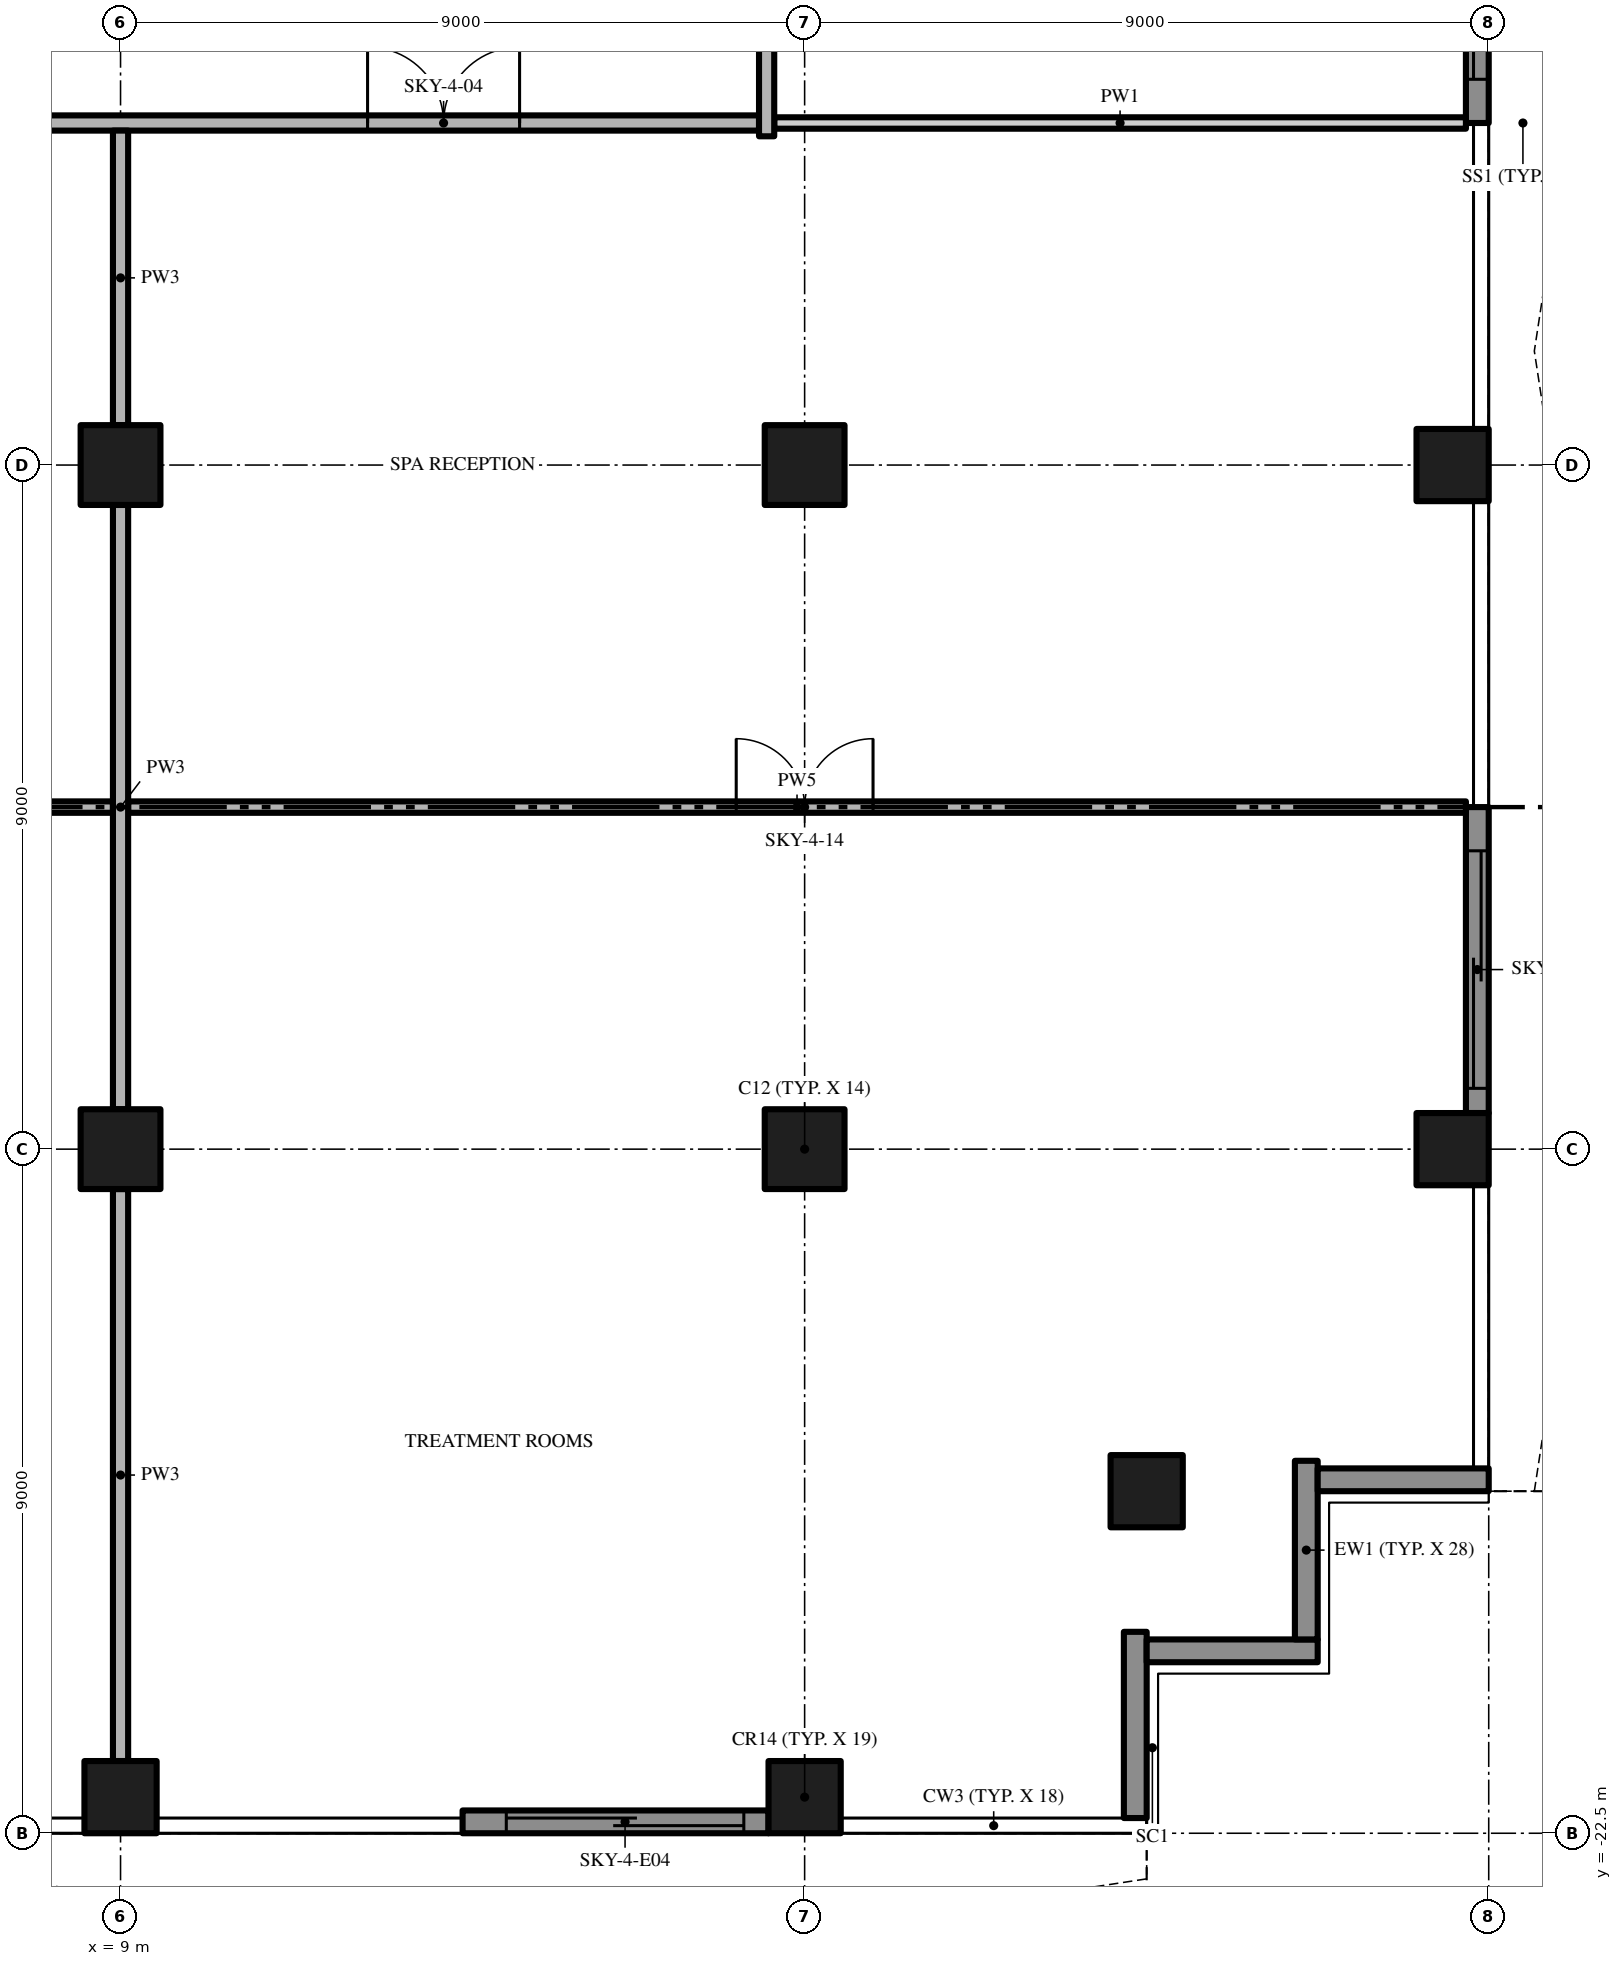
"""IFC4 building model, lengths in metres.
Left out: names, types, materials, properties, quantities, classifications, styles, units other than length and angle.
Written with IfcOpenShell. Run it as: python <this file> out.ifc"""

import sys

from ifc_helpers import new_model, si_unit, direction, frame, frame_2d, origin, origin_2d, place, context, subcontext, project, spatial, polyline, rectangle, outline, extrude, element, fill, save


model = new_model("IFC4")
c1 = context("Model", 3, precision=1e-05, world=origin(), true_north=direction((0.0, 1.0)))
c2 = subcontext(c1, "Body", "Model", "MODEL_VIEW")
j1 = project(units=[si_unit("LENGTHUNIT", "METRE"), si_unit("PLANEANGLEUNIT", "RADIAN")], contexts=[c1])
p1 = place(None, origin())
s1 = spatial("IfcSite", under=j1, at=p1, CompositionType="ELEMENT")
p2 = place(p1, origin())
s2 = spatial("IfcBuilding", under=s1, at=p2, CompositionType="ELEMENT")
p3 = place(p2, frame((0.0, 0.0, 233.8)))
s3 = spatial("IfcBuildingStorey", under=s2, at=p3, CompositionType="ELEMENT", Elevation=233.8)
p4 = place(p3, frame((18.0, -13.5, 0.0), z_axis=(0.0, 0.0, 1.0), x_axis=(1.0, 0.0, 0.0)))
e1 = element("IfcColumn", 1, at=p4, inside=s3, PredefinedType="COLUMN", context=c2, shape_type="SweptSolid", body=[
    extrude(rectangle(XDim=1.05, YDim=1.05, at=origin_2d()), origin(), (0.0, 0.0, 1.0), 4.7),
])
p5 = place(p3, frame((18.0, -22.025, 0.0), z_axis=(0.0, 0.0, 1.0), x_axis=(1.0, 0.0, 0.0)))
e2 = element("IfcColumn", 2, at=p5, inside=s3, PredefinedType="COLUMN", context=c2, shape_type="SweptSolid", body=[
    extrude(rectangle(XDim=0.95, YDim=0.95, at=origin_2d()), origin(), (0.0, 0.0, 1.0), 4.7),
])
p6 = place(p3, frame((18.0, -4.5, 0.0), z_axis=(0.0, 0.0, 1.0), x_axis=(1.0, 0.0, 0.0)))
e3 = element("IfcColumn", 3, at=p6, inside=s3, PredefinedType="COLUMN", context=c2, shape_type="SweptSolid", body=[
    extrude(rectangle(XDim=1.05, YDim=1.05, at=origin_2d()), origin(), (0.0, 0.0, 1.0), 4.7),
])
for number, where, z_axis, x_axis in (
    (4, (26.525, -13.5, 0.0), (0.0, 0.0, 1.0), (1.0, 0.0, 0.0)),
    (5, (22.5, -18.0, 0.0), (0.0, 0.0, 1.0), (1.0, 0.0, 0.0)),
    (6, (26.525, -4.5, 0.0), (0.0, 0.0, 1.0), (1.0, 0.0, 0.0)),
):
    element("IfcColumn", number, at=place(p3, frame(where, z_axis=z_axis, x_axis=x_axis)), inside=s3, PredefinedType="COLUMN", context=c2, shape_type="SweptSolid", body=[
        extrude(rectangle(XDim=0.95, YDim=0.95, at=origin_2d()), origin(), (0.0, 0.0, 1.0), 4.7),
    ])
p7 = place(p3, frame((9.0, -13.5, 0.0), z_axis=(0.0, 0.0, 1.0), x_axis=(1.0, 0.0, 0.0)))
e7 = element("IfcColumn", 7, at=p7, inside=s3, PredefinedType="COLUMN", context=c2, shape_type="SweptSolid", body=[
    extrude(rectangle(XDim=1.05, YDim=1.05, at=origin_2d()), origin(), (0.0, 0.0, 1.0), 4.7),
])
p8 = place(p3, frame((9.0, -22.025, 0.0), z_axis=(0.0, 0.0, 1.0), x_axis=(1.0, 0.0, 0.0)))
e8 = element("IfcColumn", 8, at=p8, inside=s3, PredefinedType="COLUMN", context=c2, shape_type="SweptSolid", body=[
    extrude(rectangle(XDim=0.95, YDim=0.95, at=origin_2d()), origin(), (0.0, 0.0, 1.0), 4.7),
])
p9 = place(p3, frame((9.0, -4.5, 0.0), z_axis=(0.0, 0.0, 1.0), x_axis=(1.0, 0.0, 0.0)))
e9 = element("IfcColumn", 9, at=p9, inside=s3, PredefinedType="COLUMN", context=c2, shape_type="SweptSolid", body=[
    extrude(rectangle(XDim=1.05, YDim=1.05, at=origin_2d()), origin(), (0.0, 0.0, 1.0), 4.7),
])
p10 = place(p3, frame((17.525, -22.35, 0.0), z_axis=(0.0, 0.0, 1.0), x_axis=(-1.0, 0.0, 0.0)))
e10 = element("IfcWall", 10, at=p10, inside=s3, PredefinedType="SOLIDWALL", context=c2, shape_type="SweptSolid", body=[
    extrude(rectangle(XDim=4.025, YDim=0.3, at=frame_2d((2.013, 0.0))), origin(), (0.0, 0.0, 1.0), 4.7),
])
p11 = place(p10, frame((0.325, 0.0, 0.0)))
e11 = element("IfcOpeningElement", 11, at=p11, cuts=e10, PredefinedType="OPENING", context=c2, shape_type="SweptSolid", body=[
    extrude(rectangle(XDim=3.125, YDim=2.4, at=frame_2d((1.562, 1.2))), frame((0.0, 0.16, 0.0), z_axis=(0.0, -1.0, 0.0), x_axis=(1.0, 0.0, 0.0)), (0.0, 0.0, 1.0), 0.32),
])
p12 = place(p3, frame((22.35, -19.85, 0.0), z_axis=(0.0, 0.0, 1.0), x_axis=(0.0, -1.0, 0.0)))
e12 = element("IfcWall", 12, at=p12, inside=s3, PredefinedType="SOLIDWALL", context=c2, shape_type="SweptSolid", body=[
    extrude(rectangle(XDim=2.45, YDim=0.3, at=frame_2d((1.225, 0.0))), origin(), (0.0, 0.0, 1.0), 4.7),
])
p13 = place(p3, frame((24.75, -20.1, 0.0), z_axis=(0.0, 0.0, 1.0), x_axis=(-1.0, 0.0, 0.0)))
e13 = element("IfcWall", 13, at=p13, inside=s3, PredefinedType="SOLIDWALL", context=c2, shape_type="SweptSolid", body=[
    extrude(rectangle(XDim=2.25, YDim=0.3, at=frame_2d((1.125, 0.0))), origin(), (0.0, 0.0, 1.0), 4.7),
])
p14 = place(p3, frame((24.6, -17.6, 0.0), z_axis=(0.0, 0.0, 1.0), x_axis=(0.0, -1.0, 0.0)))
e14 = element("IfcWall", 14, at=p14, inside=s3, PredefinedType="SOLIDWALL", context=c2, shape_type="SweptSolid", body=[
    extrude(rectangle(XDim=2.35, YDim=0.3, at=frame_2d((1.175, 0.0))), origin(), (0.0, 0.0, 1.0), 4.7),
])
p15 = place(p3, frame((27.0, -17.85, 0.0), z_axis=(0.0, 0.0, 1.0), x_axis=(-1.0, 0.0, 0.0)))
e15 = element("IfcWall", 15, at=p15, inside=s3, PredefinedType="SOLIDWALL", context=c2, shape_type="SweptSolid", body=[
    extrude(rectangle(XDim=2.25, YDim=0.3, at=frame_2d((1.125, 0.0))), origin(), (0.0, 0.0, 1.0), 4.7),
])
p16 = place(p3, frame((26.85, -9.0, 0.0), z_axis=(0.0, 0.0, 1.0), x_axis=(0.0, -1.0, 0.0)))
e16 = element("IfcWall", 16, at=p16, inside=s3, PredefinedType="SOLIDWALL", context=c2, shape_type="SweptSolid", body=[
    extrude(rectangle(XDim=4.025, YDim=0.3, at=frame_2d((2.013, 0.0))), origin(), (0.0, 0.0, 1.0), 4.7),
])
p17 = place(p16, frame((0.575, 0.0, 0.0)))
e17 = element("IfcOpeningElement", 17, at=p17, cuts=e16, PredefinedType="OPENING", context=c2, shape_type="SweptSolid", body=[
    extrude(rectangle(XDim=3.125, YDim=2.4, at=frame_2d((1.562, 1.2))), frame((0.0, 0.16, 0.0), z_axis=(0.0, -1.0, 0.0), x_axis=(1.0, 0.0, 0.0)), (0.0, 0.0, 1.0), 0.32),
])
p18 = place(p3, frame((26.85, 4.025, 0.0), z_axis=(0.0, 0.0, 1.0), x_axis=(0.0, -1.0, 0.0)))
e18 = element("IfcWall", 18, at=p18, inside=s3, PredefinedType="SOLIDWALL", context=c2, shape_type="SweptSolid", body=[
    extrude(rectangle(XDim=4.025, YDim=0.3, at=frame_2d((2.013, 0.0))), origin(), (0.0, 0.0, 1.0), 4.7),
])
p19 = place(p18, frame((0.325, 0.0, 0.0)))
e19 = element("IfcOpeningElement", 19, at=p19, cuts=e18, PredefinedType="OPENING", context=c2, shape_type="SweptSolid", body=[
    extrude(rectangle(XDim=3.125, YDim=2.4, at=frame_2d((1.562, 1.2))), frame((0.0, 0.16, 0.0), z_axis=(0.0, -1.0, 0.0), x_axis=(1.0, 0.0, 0.0)), (0.0, 0.0, 1.0), 0.32),
])
p20 = place(p3, origin())
e20 = element("IfcWall", 20, at=p20, inside=s3, PredefinedType="USERDEFINED", context=c2, shape_type="SweptSolid", body=[
    extrude(outline(polyline([(-22.5, -23.1), (-21.0, -23.329), (-19.5, -23.929), (-18.0, -24.671), (-16.5, -25.271), (-15.0, -25.5), (-13.5, -25.271), (-12.0, -24.671), (-10.5, -23.929), (-9.0, -23.329), (-7.5, -23.1), (-6.0, -23.329), (-4.5, -23.929), (-3.0, -24.671), (-1.5, -25.271), (0.0, -25.5), (1.5, -25.271), (3.0, -24.671), (4.5, -23.929), (6.0, -23.329), (7.5, -23.1), (9.0, -23.329), (10.5, -23.929), (12.0, -24.671), (13.5, -25.271), (15.0, -25.5), (16.5, -25.271), (18.0, -24.671), (19.5, -23.929), (21.0, -23.329), (22.5, -23.1), (22.462, -22.853), (20.934, -23.086), (19.398, -23.701), (17.898, -24.442), (16.434, -25.028), (15.0, -25.247), (13.566, -25.028), (12.102, -24.442), (10.602, -23.701), (9.066, -23.086), (7.5, -22.847), (5.934, -23.086), (4.398, -23.701), (2.898, -24.442), (1.434, -25.028), (0.0, -25.247), (-1.434, -25.028), (-2.898, -24.442), (-4.398, -23.701), (-5.934, -23.086), (-7.5, -22.847), (-9.066, -23.086), (-10.602, -23.701), (-12.102, -24.442), (-13.566, -25.028), (-15.0, -25.247), (-16.434, -25.028), (-17.898, -24.442), (-19.398, -23.701), (-20.934, -23.086), (-22.462, -22.853), (-22.5, -23.1)])), origin(), (0.0, 0.0, 1.0), 0.9),
])
p21 = place(p3, origin())
e21 = element("IfcWall", 21, at=p21, inside=s3, PredefinedType="USERDEFINED", context=c2, shape_type="SweptSolid", body=[
    extrude(outline(polyline([(27.6, -18.0), (27.829, -16.5), (28.429, -15.0), (29.171, -13.5), (29.771, -12.0), (30.0, -10.5), (29.771, -9.0), (29.171, -7.5), (28.429, -6.0), (27.829, -4.5), (27.6, -3.0), (27.829, -1.5), (28.429, 0.0), (29.171, 1.5), (29.771, 3.0), (30.0, 4.5), (29.771, 6.0), (29.171, 7.5), (28.429, 9.0), (27.829, 10.5), (27.6, 12.0), (27.829, 13.5), (28.429, 15.0), (29.171, 16.5), (29.771, 18.0), (29.539, 18.093), (28.942, 16.602), (28.201, 15.102), (27.586, 13.566), (27.347, 12.0), (27.586, 10.434), (28.201, 8.898), (28.942, 7.398), (29.528, 5.934), (29.747, 4.5), (29.528, 3.066), (28.942, 1.602), (28.201, 0.102), (27.586, -1.434), (27.347, -3.0), (27.586, -4.566), (28.201, -6.102), (28.942, -7.602), (29.528, -9.066), (29.747, -10.5), (29.528, -11.934), (28.942, -13.398), (28.201, -14.898), (27.586, -16.434), (27.353, -17.962), (27.6, -18.0)])), origin(), (0.0, 0.0, 1.0), 0.9),
])
p22 = place(p3, frame((-8.9, -9.0, 0.0), z_axis=(0.0, 0.0, 1.0), x_axis=(1.0, 0.0, 0.0)))
e22 = element("IfcWall", 22, at=p22, inside=s3, PredefinedType="PARTITIONING", context=c2, shape_type="SweptSolid", body=[
    extrude(rectangle(XDim=17.8, YDim=0.15, at=frame_2d((8.9, 0.0))), origin(), (0.0, 0.0, 1.0), 4.7),
])
p23 = place(p22, frame((8.0, 0.0, 0.0)))
e23 = element("IfcOpeningElement", 23, at=p23, cuts=e22, PredefinedType="OPENING", context=c2, shape_type="SweptSolid", body=[
    extrude(rectangle(XDim=1.8, YDim=2.4, at=frame_2d((0.9, 1.2))), frame((0.0, 0.085, 0.0), z_axis=(0.0, -1.0, 0.0), x_axis=(1.0, 0.0, 0.0)), (0.0, 0.0, 1.0), 0.17),
])
p24 = place(p3, frame((9.1, -9.0, 0.0), z_axis=(0.0, 0.0, 1.0), x_axis=(1.0, 0.0, 0.0)))
e24 = element("IfcWall", 24, at=p24, inside=s3, PredefinedType="PARTITIONING", context=c2, shape_type="SweptSolid", body=[
    extrude(rectangle(XDim=17.6, YDim=0.15, at=frame_2d((8.8, 0.0))), origin(), (0.0, 0.0, 1.0), 4.7),
])
p25 = place(p24, frame((8.0, 0.0, 0.0)))
e25 = element("IfcOpeningElement", 25, at=p25, cuts=e24, PredefinedType="OPENING", context=c2, shape_type="SweptSolid", body=[
    extrude(rectangle(XDim=1.8, YDim=2.4, at=frame_2d((0.9, 1.2))), frame((0.0, 0.085, 0.0), z_axis=(0.0, -1.0, 0.0), x_axis=(1.0, 0.0, 0.0)), (0.0, 0.0, 1.0), 0.17),
])
p26 = place(p3, frame((-17.4, 0.0, 0.0), z_axis=(0.0, 0.0, 1.0), x_axis=(1.0, 0.0, 0.0)))
e26 = element("IfcWall", 26, at=p26, inside=s3, PredefinedType="PARTITIONING", context=c2, shape_type="SweptSolid", body=[
    extrude(rectangle(XDim=34.8, YDim=0.2, at=frame_2d((17.4, 0.0))), origin(), (0.0, 0.0, 1.0), 4.7),
])
p27 = place(p26, frame((3.15, 0.0, 0.0)))
e27 = element("IfcOpeningElement", 27, at=p27, cuts=e26, PredefinedType="OPENING", context=c2, shape_type="SweptSolid", body=[
    extrude(rectangle(XDim=2.0, YDim=2.4, at=frame_2d((1.0, 1.2))), frame((0.0, 0.11, 0.0), z_axis=(0.0, -1.0, 0.0), x_axis=(1.0, 0.0, 0.0)), (0.0, 0.0, 1.0), 0.22),
])
p28 = place(p26, frame((16.4, 0.0, 0.0)))
e28 = element("IfcOpeningElement", 28, at=p28, cuts=e26, PredefinedType="OPENING", context=c2, shape_type="SweptSolid", body=[
    extrude(rectangle(XDim=2.0, YDim=2.4, at=frame_2d((1.0, 1.2))), frame((0.0, 0.11, 0.0), z_axis=(0.0, -1.0, 0.0), x_axis=(1.0, 0.0, 0.0)), (0.0, 0.0, 1.0), 0.22),
])
p29 = place(p26, frame((29.65, 0.0, 0.0)))
e29 = element("IfcOpeningElement", 29, at=p29, cuts=e26, PredefinedType="OPENING", context=c2, shape_type="SweptSolid", body=[
    extrude(rectangle(XDim=2.0, YDim=2.4, at=frame_2d((1.0, 1.2))), frame((0.0, 0.11, 0.0), z_axis=(0.0, -1.0, 0.0), x_axis=(1.0, 0.0, 0.0)), (0.0, 0.0, 1.0), 0.22),
])
p30 = place(p3, frame((17.6, 0.0, 0.0), z_axis=(0.0, 0.0, 1.0), x_axis=(1.0, 0.0, 0.0)))
e30 = element("IfcWall", 30, at=p30, inside=s3, PredefinedType="PARTITIONING", context=c2, shape_type="SweptSolid", body=[
    extrude(rectangle(XDim=9.1, YDim=0.15, at=frame_2d((4.55, 0.0))), origin(), (0.0, 0.0, 1.0), 4.7),
])
p31 = place(p3, frame((9.0, -21.55, 0.0), z_axis=(0.0, 0.0, 1.0), x_axis=(0.0, 1.0, 0.0)))
e31 = element("IfcWall", 31, at=p31, inside=s3, PredefinedType="PARTITIONING", context=c2, shape_type="SweptSolid", body=[
    extrude(rectangle(XDim=7.525, YDim=0.2, at=frame_2d((3.763, 0.0))), origin(), (0.0, 0.0, 1.0), 4.7),
])
p32 = place(p3, frame((9.0, -12.975, 0.0), z_axis=(0.0, 0.0, 1.0), x_axis=(0.0, 1.0, 0.0)))
e32 = element("IfcWall", 32, at=p32, inside=s3, PredefinedType="PARTITIONING", context=c2, shape_type="SweptSolid", body=[
    extrude(rectangle(XDim=7.95, YDim=0.2, at=frame_2d((3.975, 0.0))), origin(), (0.0, 0.0, 1.0), 4.7),
])
p33 = place(p3, frame((9.0, -3.975, 0.0), z_axis=(0.0, 0.0, 1.0), x_axis=(0.0, 1.0, 0.0)))
e33 = element("IfcWall", 33, at=p33, inside=s3, PredefinedType="PARTITIONING", context=c2, shape_type="SweptSolid", body=[
    extrude(rectangle(XDim=3.875, YDim=0.2, at=frame_2d((1.938, 0.0))), origin(), (0.0, 0.0, 1.0), 4.7),
])
p34 = place(p3, frame((17.5, -0.175, 0.0), z_axis=(0.0, 0.0, 1.0), x_axis=(0.0, 1.0, 0.0)))
e34 = element("IfcWall", 34, at=p34, inside=s3, PredefinedType="PARTITIONING", context=c2, shape_type="SweptSolid", body=[
    extrude(rectangle(XDim=4.15, YDim=0.2, at=frame_2d((2.075, 0.0))), origin(), (0.0, 0.0, 1.0), 4.7),
])
p35 = place(p34, frame((1.525, 0.0, 0.0)))
e35 = element("IfcOpeningElement", 35, at=p35, cuts=e34, PredefinedType="OPENING", context=c2, shape_type="SweptSolid", body=[
    extrude(rectangle(XDim=1.8, YDim=2.4, at=frame_2d((0.9, 1.2))), frame((0.0, 0.11, 0.0), z_axis=(0.0, -1.0, 0.0), x_axis=(1.0, 0.0, 0.0)), (0.0, 0.0, 1.0), 0.22),
])
p36 = place(p11, origin())
e36 = element("IfcDoor", 36, at=p36, inside=s3, OperationType="SINGLE_SWING_LEFT", PredefinedType="DOOR", context=c2, shape_type="SweptSolid", body=[
    extrude(rectangle(XDim=3.125, YDim=2.4, at=frame_2d((1.562, 1.2))), frame((0.0, 0.025, 0.0), z_axis=(0.0, -1.0, 0.0), x_axis=(1.0, 0.0, 0.0)), (0.0, 0.0, 1.0), 0.05),
])
fill(e11, e36)
p37 = place(p17, origin())
e37 = element("IfcDoor", 37, at=p37, inside=s3, OperationType="SINGLE_SWING_LEFT", PredefinedType="DOOR", context=c2, shape_type="SweptSolid", body=[
    extrude(rectangle(XDim=3.125, YDim=2.4, at=frame_2d((1.562, 1.2))), frame((0.0, 0.025, 0.0), z_axis=(0.0, -1.0, 0.0), x_axis=(1.0, 0.0, 0.0)), (0.0, 0.0, 1.0), 0.05),
])
fill(e17, e37)
p38 = place(p19, origin())
e38 = element("IfcDoor", 38, at=p38, inside=s3, OperationType="SINGLE_SWING_LEFT", PredefinedType="DOOR", context=c2, shape_type="SweptSolid", body=[
    extrude(rectangle(XDim=3.125, YDim=2.4, at=frame_2d((1.562, 1.2))), frame((0.0, 0.025, 0.0), z_axis=(0.0, -1.0, 0.0), x_axis=(1.0, 0.0, 0.0)), (0.0, 0.0, 1.0), 0.05),
])
fill(e19, e38)
p39 = place(p29, origin())
e39 = element("IfcDoor", 39, at=p39, inside=s3, OperationType="DOUBLE_DOOR_SINGLE_SWING", PredefinedType="DOOR", context=c2, shape_type="SweptSolid", body=[
    extrude(rectangle(XDim=2.0, YDim=2.4, at=frame_2d((1.0, 1.2))), frame((0.0, 0.025, 0.0), z_axis=(0.0, -1.0, 0.0), x_axis=(1.0, 0.0, 0.0)), (0.0, 0.0, 1.0), 0.05),
])
fill(e29, e39)
p40 = place(p25, origin())
e40 = element("IfcDoor", 40, at=p40, inside=s3, OperationType="DOUBLE_DOOR_SINGLE_SWING", PredefinedType="DOOR", context=c2, shape_type="SweptSolid", body=[
    extrude(rectangle(XDim=1.8, YDim=2.4, at=frame_2d((0.9, 1.2))), frame((0.0, 0.025, 0.0), z_axis=(0.0, -1.0, 0.0), x_axis=(1.0, 0.0, 0.0)), (0.0, 0.0, 1.0), 0.05),
])
fill(e25, e40)
save(model, sys.argv[1])
